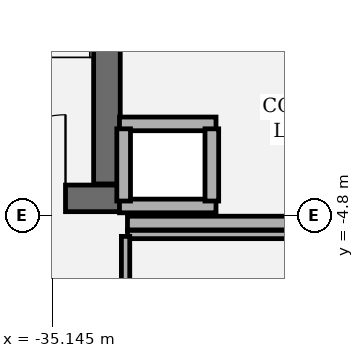
"""IFC4 building model, lengths in metres.
Left out: names, types, materials, properties, quantities, classifications, styles, units other than length and angle.
Written with IfcOpenShell. Run it as: python <this file> out.ifc"""

import sys

from ifc_helpers import new_model, si_unit, direction, frame, frame_2d, origin, place, context, subcontext, project, spatial, rectangle, extrude, element, fill, save


model = new_model("IFC4")
c1 = context("Model", 3, precision=1e-05, world=origin(), true_north=direction((0.0, 1.0)))
c2 = subcontext(c1, "Body", "Model", "MODEL_VIEW")
j1 = project(units=[si_unit("LENGTHUNIT", "METRE"), si_unit("PLANEANGLEUNIT", "RADIAN")], contexts=[c1])
p1 = place(None, origin())
s1 = spatial("IfcSite", under=j1, at=p1, CompositionType="ELEMENT")
p2 = place(p1, origin())
s2 = spatial("IfcBuilding", under=s1, at=p2, CompositionType="ELEMENT")
p3 = place(p2, frame((0.0, 0.0, 6.6)))
s3 = spatial("IfcBuildingStorey", under=s2, at=p3, CompositionType="ELEMENT", Elevation=6.6)
p4 = place(p3, frame((-13.635, -37.094, 0.0), z_axis=(0.0, 0.0, 1.0), x_axis=(-0.842602364841, 0.538536214905, 0.0)))
e1 = element("IfcWall", 1, at=p4, inside=s3, PredefinedType="SOLIDWALL", context=c2, shape_type="SweptSolid", body=[
    extrude(rectangle(XDim=60.27, YDim=0.38, at=frame_2d((30.135, 0.0))), origin(), (0.0, 0.0, 1.0), 5.14),
])
p5 = place(p4, frame((29.435, 0.0, 0.8)))
e2 = element("IfcOpeningElement", 2, at=p5, cuts=e1, PredefinedType="OPENING", context=c2, shape_type="SweptSolid", body=[
    extrude(rectangle(XDim=1.4, YDim=1.5, at=frame_2d((0.7, 0.75))), frame((0.0, 0.2, 0.0), z_axis=(0.0, -1.0, 0.0), x_axis=(1.0, 0.0, 0.0)), (0.0, 0.0, 1.0), 0.4),
])
p6 = place(p3, frame((-38.46, -4.575, 0.0), z_axis=(0.0, 0.0, 1.0), x_axis=(1.0, 0.0, 0.0)))
e3 = element("IfcWall", 3, at=p6, inside=s3, PredefinedType="SHEAR", context=c2, shape_type="SweptSolid", body=[
    extrude(rectangle(XDim=4.21, YDim=0.35, at=frame_2d((2.105, 0.0))), origin(), (0.0, 0.0, 1.0), 5.14),
])
p7 = place(p6, frame((2.39, 0.0, 0.0)))
e4 = element("IfcOpeningElement", 4, at=p7, cuts=e3, PredefinedType="OPENING", context=c2, shape_type="SweptSolid", body=[
    extrude(rectangle(XDim=1.1, YDim=2.2, at=frame_2d((0.55, 1.1))), frame((0.0, 0.185, 0.0), z_axis=(0.0, -1.0, 0.0), x_axis=(1.0, 0.0, 0.0)), (0.0, 0.0, 1.0), 0.37),
])
p8 = place(p3, frame((-34.425, -4.385, 0.0), z_axis=(0.0, 0.0, 1.0), x_axis=(0.0, 1.0, 0.0)))
e5 = element("IfcWall", 5, at=p8, inside=s3, PredefinedType="SHEAR", context=c2, shape_type="SweptSolid", body=[
    extrude(rectangle(XDim=8.77, YDim=0.35, at=frame_2d((4.385, 0.0))), origin(), (0.0, 0.0, 1.0), 5.14),
])
for number, where, z_axis, x_axis in (
    (6, (-32.99, -4.675, 0.0), (0.0, 0.0, 1.0), (-1.0, 0.0, 0.0)),
    (7, (-34.26, -3.595, 0.0), (0.0, 0.0, 1.0), (1.0, 0.0, 0.0)),
):
    element("IfcWall", number, at=place(p3, frame(where, z_axis=z_axis, x_axis=x_axis)), inside=s3, PredefinedType="PARTITIONING", context=c2, shape_type="SweptSolid", body=[
        extrude(rectangle(XDim=1.27, YDim=0.18, at=frame_2d((0.635, 0.0))), origin(), (0.0, 0.0, 1.0), 5.14),
    ])
for number, where, z_axis, x_axis in (
    (8, (-34.205, -4.61, 0.0), (0.0, 0.0, 1.0), (0.0, 1.0, 0.0)),
    (9, (-33.045, -3.66, 0.0), (0.0, 0.0, 1.0), (0.0, -1.0, 0.0)),
):
    element("IfcWall", number, at=place(p3, frame(where, z_axis=z_axis, x_axis=x_axis)), inside=s3, PredefinedType="PARTITIONING", context=c2, shape_type="SweptSolid", body=[
        extrude(rectangle(XDim=0.95, YDim=0.18, at=frame_2d((0.475, 0.0))), origin(), (0.0, 0.0, 1.0), 5.14),
    ])
p9 = place(p3, frame((-31.165, -5.05, 0.0), z_axis=(0.0, 0.0, 1.0), x_axis=(-1.0, 0.0, 0.0)))
e10 = element("IfcWall", 10, at=p9, inside=s3, PredefinedType="PARTITIONING", context=c2, shape_type="SweptSolid", body=[
    extrude(rectangle(XDim=2.99, YDim=0.11, at=frame_2d((1.495, 0.0))), origin(), (0.0, 0.0, 1.0), 5.14),
])
p10 = place(p3, frame((-34.18, -5.075, 0.0), z_axis=(0.0, 0.0, 1.0), x_axis=(0.0, -1.0, 0.0)))
e11 = element("IfcWall", 11, at=p10, inside=s3, PredefinedType="PARTITIONING", context=c2, shape_type="SweptSolid", body=[
    extrude(rectangle(XDim=3.25, YDim=0.11, at=frame_2d((1.625, 0.0))), origin(), (0.0, 0.0, 1.0), 5.14),
])
p11 = place(p10, frame((1.185, 0.0, 0.0)))
e12 = element("IfcOpeningElement", 12, at=p11, cuts=e11, PredefinedType="OPENING", context=c2, shape_type="SweptSolid", body=[
    extrude(rectangle(XDim=0.88, YDim=2.1, at=frame_2d((0.44, 1.05))), frame((0.0, 0.065, 0.0), z_axis=(0.0, -1.0, 0.0), x_axis=(1.0, 0.0, 0.0)), (0.0, 0.0, 1.0), 0.13),
])
p12 = place(p3, frame((-34.155, -4.9, 0.0), z_axis=(0.0, 0.0, 1.0), x_axis=(1.0, 0.0, 0.0)))
e13 = element("IfcWall", 13, at=p12, inside=s3, PredefinedType="PARTITIONING", context=c2, shape_type="SweptSolid", body=[
    extrude(rectangle(XDim=2.99, YDim=0.18, at=frame_2d((1.495, 0.0))), origin(), (0.0, 0.0, 1.0), 5.14),
])
p13 = place(p7, origin())
e14 = element("IfcDoor", 14, at=p13, inside=s3, OperationType="SINGLE_SWING_RIGHT", PredefinedType="DOOR", context=c2, shape_type="SweptSolid", body=[
    extrude(rectangle(XDim=1.1, YDim=2.2, at=frame_2d((0.55, 1.1))), frame((0.0, 0.025, 0.0), z_axis=(0.0, -1.0, 0.0), x_axis=(1.0, 0.0, 0.0)), (0.0, 0.0, 1.0), 0.05),
])
fill(e4, e14)
save(model, sys.argv[1])
